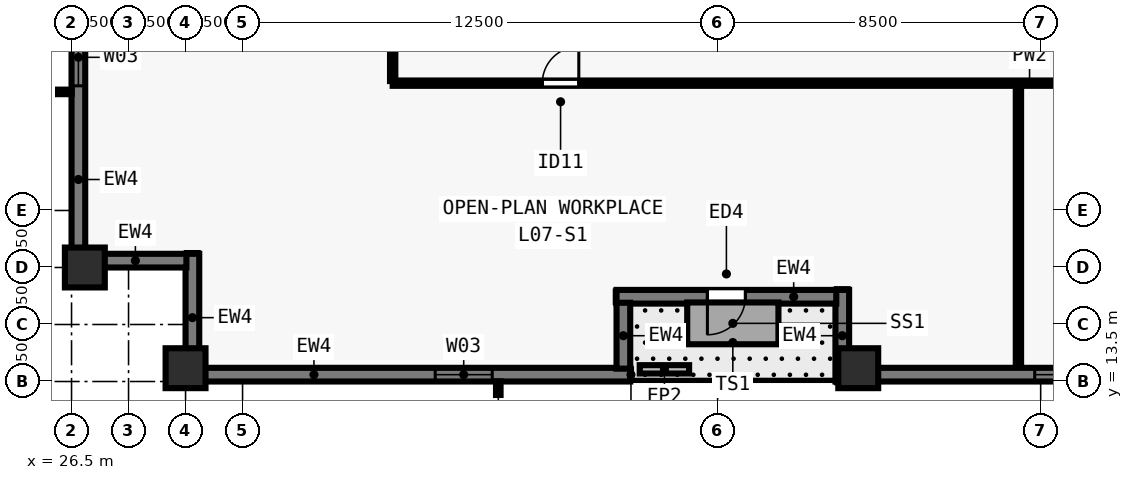
"""IFC4 building model, lengths in metres.
Left out: names, types, materials, properties, quantities, classifications, styles, units other than length and angle.
Written with IfcOpenShell. Run it as: python <this file> out.ifc"""

import sys

from ifc_helpers import new_model, si_unit, direction, frame, frame_2d, origin, origin_2d, place, context, subcontext, project, spatial, rectangle, extrude, element, fill, save


model = new_model("IFC4")
c1 = context("Model", 3, precision=1e-05, world=origin(), true_north=direction((0.0, 1.0)))
c2 = subcontext(c1, "Body", "Model", "MODEL_VIEW")
j1 = project(units=[si_unit("LENGTHUNIT", "METRE"), si_unit("PLANEANGLEUNIT", "RADIAN")], contexts=[c1])
p1 = place(None, origin())
s1 = spatial("IfcSite", under=j1, at=p1, CompositionType="ELEMENT")
p2 = place(p1, origin())
s2 = spatial("IfcBuilding", under=s1, at=p2, CompositionType="ELEMENT")
p3 = place(p2, frame((0.0, 0.0, 30.5)))
s3 = spatial("IfcBuildingStorey", under=s2, at=p3, CompositionType="ELEMENT", Elevation=30.5)
for number, where, z_axis, x_axis in (
    (1, (29.5, 13.85, 0.0), (0.0, 0.0, 1.0), (1.0, 0.0, 0.0)),
    (2, (47.2, 13.85, 0.0), (0.0, 0.0, 1.0), (1.0, 0.0, 0.0)),
    (3, (26.85, 16.5, 0.0), (0.0, 0.0, 1.0), (0.0, 1.0, 0.0)),
):
    element("IfcColumn", number, at=place(p3, frame(where, z_axis=z_axis, x_axis=x_axis)), inside=s3, PredefinedType="COLUMN", context=c2, shape_type="SweptSolid", body=[
        extrude(rectangle(XDim=1.05, YDim=1.05, at=origin_2d()), origin(), (0.0, 0.0, 1.0), 3.5),
    ])
p4 = place(p3, frame((41.2, 13.68, 0.0), z_axis=(0.0, 0.0, 1.0), x_axis=(-1.0, 0.0, 0.0)))
e4 = element("IfcWall", 4, at=p4, inside=s3, PredefinedType="SOLIDWALL", context=c2, shape_type="SweptSolid", body=[
    extrude(rectangle(XDim=11.362, YDim=0.36, at=frame_2d((5.681, 0.0))), origin(), (0.0, 0.0, 1.0), 3.28),
])
p5 = place(p4, frame((3.631, 0.0, 0.8)))
e5 = element("IfcOpeningElement", 5, at=p5, cuts=e4, PredefinedType="OPENING", context=c2, shape_type="SweptSolid", body=[
    extrude(rectangle(XDim=1.5, YDim=1.544, at=frame_2d((0.75, 0.772))), frame((0.0, 0.19, 0.0), z_axis=(0.0, -1.0, 0.0), x_axis=(1.0, 0.0, 0.0)), (0.0, 0.0, 1.0), 0.38),
])
p6 = place(p3, frame((29.68, 13.5, 0.0), z_axis=(0.0, 0.0, 1.0), x_axis=(0.0, 1.0, 0.0)))
e6 = element("IfcWall", 6, at=p6, inside=s3, PredefinedType="SOLIDWALL", context=c2, shape_type="SweptSolid", body=[
    extrude(rectangle(XDim=3.36, YDim=0.36, at=frame_2d((1.68, 0.0))), origin(), (0.0, 0.0, 1.0), 3.28),
])
p7 = place(p3, frame((29.522, 16.68, 0.0), z_axis=(0.0, 0.0, 1.0), x_axis=(-1.0, 0.0, 0.0)))
e7 = element("IfcWall", 7, at=p7, inside=s3, PredefinedType="SOLIDWALL", context=c2, shape_type="SweptSolid", body=[
    extrude(rectangle(XDim=2.684, YDim=0.36, at=frame_2d((1.342, 0.0))), origin(), (0.0, 0.0, 1.0), 3.28),
])
p8 = place(p3, frame((26.68, 16.5, 0.0), z_axis=(0.0, 0.0, 1.0), x_axis=(0.0, 1.0, 0.0)))
e8 = element("IfcWall", 8, at=p8, inside=s3, PredefinedType="SOLIDWALL", context=c2, shape_type="SweptSolid", body=[
    extrude(rectangle(XDim=44.662, YDim=0.36, at=frame_2d((22.331, 0.0))), origin(), (0.0, 0.0, 1.0), 3.28),
])
p9 = place(p8, frame((4.78, 0.0, 0.8)))
e9 = element("IfcOpeningElement", 9, at=p9, cuts=e8, PredefinedType="OPENING", context=c2, shape_type="SweptSolid", body=[
    extrude(rectangle(XDim=1.5, YDim=1.544, at=frame_2d((0.75, 0.772))), frame((0.0, 0.19, 0.0), z_axis=(0.0, -1.0, 0.0), x_axis=(1.0, 0.0, 0.0)), (0.0, 0.0, 1.0), 0.38),
])
p10 = place(p8, frame((8.29, 0.0, 0.8)))
e10 = element("IfcOpeningElement", 10, at=p10, cuts=e8, PredefinedType="OPENING", context=c2, shape_type="SweptSolid", body=[
    extrude(rectangle(XDim=1.2, YDim=1.544, at=frame_2d((0.6, 0.772))), frame((0.0, 0.19, 0.0), z_axis=(0.0, -1.0, 0.0), x_axis=(1.0, 0.0, 0.0)), (0.0, 0.0, 1.0), 0.38),
])
p11 = place(p8, frame((11.5, 0.0, 0.8)))
e11 = element("IfcOpeningElement", 11, at=p11, cuts=e8, PredefinedType="OPENING", context=c2, shape_type="SweptSolid", body=[
    extrude(rectangle(XDim=1.5, YDim=1.544, at=frame_2d((0.75, 0.772))), frame((0.0, 0.19, 0.0), z_axis=(0.0, -1.0, 0.0), x_axis=(1.0, 0.0, 0.0)), (0.0, 0.0, 1.0), 0.38),
])
p12 = place(p8, frame((14.561, 0.0, 0.8)))
e12 = element("IfcOpeningElement", 12, at=p12, cuts=e8, PredefinedType="OPENING", context=c2, shape_type="SweptSolid", body=[
    extrude(rectangle(XDim=1.2, YDim=1.544, at=frame_2d((0.6, 0.772))), frame((0.0, 0.19, 0.0), z_axis=(0.0, -1.0, 0.0), x_axis=(1.0, 0.0, 0.0)), (0.0, 0.0, 1.0), 0.38),
])
p13 = place(p8, frame((18.671, 0.0, 0.8)))
e13 = element("IfcOpeningElement", 13, at=p13, cuts=e8, PredefinedType="OPENING", context=c2, shape_type="SweptSolid", body=[
    extrude(rectangle(XDim=1.5, YDim=1.544, at=frame_2d((0.75, 0.772))), frame((0.0, 0.19, 0.0), z_axis=(0.0, -1.0, 0.0), x_axis=(1.0, 0.0, 0.0)), (0.0, 0.0, 1.0), 0.38),
])
p14 = place(p8, frame((21.731, 0.0, 0.8)))
e14 = element("IfcOpeningElement", 14, at=p14, cuts=e8, PredefinedType="OPENING", context=c2, shape_type="SweptSolid", body=[
    extrude(rectangle(XDim=1.2, YDim=1.544, at=frame_2d((0.6, 0.772))), frame((0.0, 0.19, 0.0), z_axis=(0.0, -1.0, 0.0), x_axis=(1.0, 0.0, 0.0)), (0.0, 0.0, 1.0), 0.38),
])
p15 = place(p8, frame((24.941, 0.0, 0.8)))
e15 = element("IfcOpeningElement", 15, at=p15, cuts=e8, PredefinedType="OPENING", context=c2, shape_type="SweptSolid", body=[
    extrude(rectangle(XDim=1.5, YDim=1.544, at=frame_2d((0.75, 0.772))), frame((0.0, 0.19, 0.0), z_axis=(0.0, -1.0, 0.0), x_axis=(1.0, 0.0, 0.0)), (0.0, 0.0, 1.0), 0.38),
])
p16 = place(p8, frame((29.302, 0.0, 0.8)))
e16 = element("IfcOpeningElement", 16, at=p16, cuts=e8, PredefinedType="OPENING", context=c2, shape_type="SweptSolid", body=[
    extrude(rectangle(XDim=1.2, YDim=1.544, at=frame_2d((0.6, 0.772))), frame((0.0, 0.19, 0.0), z_axis=(0.0, -1.0, 0.0), x_axis=(1.0, 0.0, 0.0)), (0.0, 0.0, 1.0), 0.38),
])
p17 = place(p8, frame((31.662, 0.0, 0.8)))
e17 = element("IfcOpeningElement", 17, at=p17, cuts=e8, PredefinedType="OPENING", context=c2, shape_type="SweptSolid", body=[
    extrude(rectangle(XDim=1.5, YDim=1.544, at=frame_2d((0.75, 0.772))), frame((0.0, 0.19, 0.0), z_axis=(0.0, -1.0, 0.0), x_axis=(1.0, 0.0, 0.0)), (0.0, 0.0, 1.0), 0.38),
])
p18 = place(p8, frame((35.172, 0.0, 0.8)))
e18 = element("IfcOpeningElement", 18, at=p18, cuts=e8, PredefinedType="OPENING", context=c2, shape_type="SweptSolid", body=[
    extrude(rectangle(XDim=1.2, YDim=1.544, at=frame_2d((0.6, 0.772))), frame((0.0, 0.19, 0.0), z_axis=(0.0, -1.0, 0.0), x_axis=(1.0, 0.0, 0.0)), (0.0, 0.0, 1.0), 0.38),
])
p19 = place(p8, frame((38.382, 0.0, 0.8)))
e19 = element("IfcOpeningElement", 19, at=p19, cuts=e8, PredefinedType="OPENING", context=c2, shape_type="SweptSolid", body=[
    extrude(rectangle(XDim=1.5, YDim=1.544, at=frame_2d((0.75, 0.772))), frame((0.0, 0.19, 0.0), z_axis=(0.0, -1.0, 0.0), x_axis=(1.0, 0.0, 0.0)), (0.0, 0.0, 1.0), 0.38),
])
p20 = place(p3, frame((74.5, 13.68, 0.0), z_axis=(0.0, 0.0, 1.0), x_axis=(-1.0, 0.0, 0.0)))
e20 = element("IfcWall", 20, at=p20, inside=s3, PredefinedType="SOLIDWALL", context=c2, shape_type="SweptSolid", body=[
    extrude(rectangle(XDim=27.562, YDim=0.36, at=frame_2d((13.781, 0.0))), origin(), (0.0, 0.0, 1.0), 3.28),
])
p21 = place(p20, frame((4.755, 0.0, 0.8)))
e21 = element("IfcOpeningElement", 21, at=p21, cuts=e20, PredefinedType="OPENING", context=c2, shape_type="SweptSolid", body=[
    extrude(rectangle(XDim=1.5, YDim=1.544, at=frame_2d((0.75, 0.772))), frame((0.0, 0.19, 0.0), z_axis=(0.0, -1.0, 0.0), x_axis=(1.0, 0.0, 0.0)), (0.0, 0.0, 1.0), 0.38),
])
p22 = place(p20, frame((8.216, 0.0, 0.8)))
e22 = element("IfcOpeningElement", 22, at=p22, cuts=e20, PredefinedType="OPENING", context=c2, shape_type="SweptSolid", body=[
    extrude(rectangle(XDim=1.2, YDim=1.544, at=frame_2d((0.6, 0.772))), frame((0.0, 0.19, 0.0), z_axis=(0.0, -1.0, 0.0), x_axis=(1.0, 0.0, 0.0)), (0.0, 0.0, 1.0), 0.38),
])
p23 = place(p20, frame((11.376, 0.0, 0.8)))
e23 = element("IfcOpeningElement", 23, at=p23, cuts=e20, PredefinedType="OPENING", context=c2, shape_type="SweptSolid", body=[
    extrude(rectangle(XDim=1.5, YDim=1.544, at=frame_2d((0.75, 0.772))), frame((0.0, 0.19, 0.0), z_axis=(0.0, -1.0, 0.0), x_axis=(1.0, 0.0, 0.0)), (0.0, 0.0, 1.0), 0.38),
])
p24 = place(p20, frame((14.836, 0.0, 0.8)))
e24 = element("IfcOpeningElement", 24, at=p24, cuts=e20, PredefinedType="OPENING", context=c2, shape_type="SweptSolid", body=[
    extrude(rectangle(XDim=1.2, YDim=1.544, at=frame_2d((0.6, 0.772))), frame((0.0, 0.19, 0.0), z_axis=(0.0, -1.0, 0.0), x_axis=(1.0, 0.0, 0.0)), (0.0, 0.0, 1.0), 0.38),
])
p25 = place(p20, frame((18.447, 0.0, 0.8)))
e25 = element("IfcOpeningElement", 25, at=p25, cuts=e20, PredefinedType="OPENING", context=c2, shape_type="SweptSolid", body=[
    extrude(rectangle(XDim=1.5, YDim=1.544, at=frame_2d((0.75, 0.772))), frame((0.0, 0.19, 0.0), z_axis=(0.0, -1.0, 0.0), x_axis=(1.0, 0.0, 0.0)), (0.0, 0.0, 1.0), 0.38),
])
p26 = place(p20, frame((21.457, 0.0, 0.8)))
e26 = element("IfcOpeningElement", 26, at=p26, cuts=e20, PredefinedType="OPENING", context=c2, shape_type="SweptSolid", body=[
    extrude(rectangle(XDim=1.2, YDim=1.544, at=frame_2d((0.6, 0.772))), frame((0.0, 0.19, 0.0), z_axis=(0.0, -1.0, 0.0), x_axis=(1.0, 0.0, 0.0)), (0.0, 0.0, 1.0), 0.38),
])
p27 = place(p3, frame((46.78, 13.5, 0.0), z_axis=(0.0, 0.0, 1.0), x_axis=(0.0, 1.0, 0.0)))
e27 = element("IfcWall", 27, at=p27, inside=s3, PredefinedType="SOLIDWALL", context=c2, shape_type="SweptSolid", body=[
    extrude(rectangle(XDim=2.41, YDim=0.36, at=frame_2d((1.205, 0.0))), origin(), (0.0, 0.0, 1.0), 3.28),
])
p28 = place(p3, frame((46.622, 15.73, 0.0), z_axis=(0.0, 0.0, 1.0), x_axis=(-1.0, 0.0, 0.0)))
e28 = element("IfcWall", 28, at=p28, inside=s3, PredefinedType="SOLIDWALL", context=c2, shape_type="SweptSolid", body=[
    extrude(rectangle(XDim=5.782, YDim=0.36, at=frame_2d((2.891, 0.0))), origin(), (0.0, 0.0, 1.0), 3.28),
])
p29 = place(p28, frame((2.391, 0.0, 0.0)))
e29 = element("IfcOpeningElement", 29, at=p29, cuts=e28, PredefinedType="OPENING", context=c2, shape_type="SweptSolid", body=[
    extrude(rectangle(XDim=1.0, YDim=2.15, at=frame_2d((0.5, 1.075))), frame((0.0, 0.19, 0.0), z_axis=(0.0, -1.0, 0.0), x_axis=(1.0, 0.0, 0.0)), (0.0, 0.0, 1.0), 0.38),
])
p30 = place(p3, frame((41.02, 15.572, 0.0), z_axis=(0.0, 0.0, 1.0), x_axis=(0.0, -1.0, 0.0)))
e30 = element("IfcWall", 30, at=p30, inside=s3, PredefinedType="SOLIDWALL", context=c2, shape_type="SweptSolid", body=[
    extrude(rectangle(XDim=1.734, YDim=0.36, at=frame_2d((0.867, 0.0))), origin(), (0.0, 0.0, 1.0), 3.28),
])
p31 = place(p3, frame((41.45, 13.82, 0.0), z_axis=(0.0, 0.0, 1.0), x_axis=(1.0, 0.0, 0.0)))
e31 = element("IfcWall", 31, at=p31, inside=s3, PredefinedType="PARAPET", context=c2, shape_type="SweptSolid", body=[
    extrude(rectangle(XDim=1.3, YDim=0.22, at=frame_2d((0.65, 0.0))), origin(), (0.0, 0.0, 1.0), 0.55),
])
p32 = place(p3, frame((34.95, 21.35, 0.0), z_axis=(0.0, 0.0, 1.0), x_axis=(1.0, 0.0, 0.0)))
e32 = element("IfcWall", 32, at=p32, inside=s3, PredefinedType="PARTITIONING", context=c2, shape_type="SweptSolid", body=[
    extrude(rectangle(XDim=34.1, YDim=0.14, at=frame_2d((17.05, 0.0))), origin(), (0.0, 0.0, 1.0), 3.28),
])
p33 = place(p32, frame((3.938, 0.0, 0.0)))
e33 = element("IfcOpeningElement", 33, at=p33, cuts=e32, PredefinedType="OPENING", context=c2, shape_type="SweptSolid", body=[
    extrude(rectangle(XDim=0.96, YDim=2.12, at=frame_2d((0.48, 1.06))), frame((0.0, 0.08, 0.0), z_axis=(0.0, -1.0, 0.0), x_axis=(1.0, 0.0, 0.0)), (0.0, 0.0, 1.0), 0.16),
])
p34 = place(p32, frame((28.617, 0.0, 0.0)))
e34 = element("IfcOpeningElement", 34, at=p34, cuts=e32, PredefinedType="OPENING", context=c2, shape_type="SweptSolid", body=[
    extrude(rectangle(XDim=0.96, YDim=2.12, at=frame_2d((0.48, 1.06))), frame((0.0, 0.08, 0.0), z_axis=(0.0, -1.0, 0.0), x_axis=(1.0, 0.0, 0.0)), (0.0, 0.0, 1.0), 0.16),
])
p35 = place(p3, frame((34.95, 21.405, 0.0), z_axis=(0.0, 0.0, 1.0), x_axis=(0.0, 1.0, 0.0)))
e35 = element("IfcWall", 35, at=p35, inside=s3, PredefinedType="PARTITIONING", context=c2, shape_type="SweptSolid", body=[
    extrude(rectangle(XDim=35.19, YDim=0.14, at=frame_2d((17.595, 0.0))), origin(), (0.0, 0.0, 1.0), 3.28),
])
p36 = place(p35, frame((5.21, 0.0, 0.0)))
e36 = element("IfcOpeningElement", 36, at=p36, cuts=e35, PredefinedType="OPENING", context=c2, shape_type="SweptSolid", body=[
    extrude(rectangle(XDim=0.96, YDim=2.12, at=frame_2d((0.48, 1.06))), frame((0.0, 0.08, 0.0), z_axis=(0.0, -1.0, 0.0), x_axis=(1.0, 0.0, 0.0)), (0.0, 0.0, 1.0), 0.16),
])
p37 = place(p35, frame((17.052, 0.0, 0.0)))
e37 = element("IfcOpeningElement", 37, at=p37, cuts=e35, PredefinedType="OPENING", context=c2, shape_type="SweptSolid", body=[
    extrude(rectangle(XDim=0.96, YDim=2.12, at=frame_2d((0.48, 1.06))), frame((0.0, 0.08, 0.0), z_axis=(0.0, -1.0, 0.0), x_axis=(1.0, 0.0, 0.0)), (0.0, 0.0, 1.0), 0.16),
])
p38 = place(p35, frame((28.957, 0.0, 0.0)))
e38 = element("IfcOpeningElement", 38, at=p38, cuts=e35, PredefinedType="OPENING", context=c2, shape_type="SweptSolid", body=[
    extrude(rectangle(XDim=0.96, YDim=2.12, at=frame_2d((0.48, 1.06))), frame((0.0, 0.08, 0.0), z_axis=(0.0, -1.0, 0.0), x_axis=(1.0, 0.0, 0.0)), (0.0, 0.0, 1.0), 0.16),
])
p39 = place(p3, frame((51.415, 13.92, 0.0), z_axis=(0.0, 0.0, 1.0), x_axis=(0.0, 1.0, 0.0)))
e39 = element("IfcWall", 39, at=p39, inside=s3, PredefinedType="PARTITIONING", context=c2, shape_type="SweptSolid", body=[
    extrude(rectangle(XDim=7.33, YDim=0.14, at=frame_2d((3.665, 0.0))), origin(), (0.0, 0.0, 1.0), 2.849),
])
p40 = place(p5, origin())
e40 = element("IfcWindow", 40, at=p40, inside=s3, PartitioningType="SINGLE_PANEL", PredefinedType="WINDOW", context=c2, shape_type="SweptSolid", body=[
    extrude(rectangle(XDim=1.5, YDim=1.544, at=frame_2d((0.75, 0.772))), frame((0.0, -0.05, 0.0), z_axis=(0.0, -1.0, 0.0), x_axis=(1.0, 0.0, 0.0)), (0.0, 0.0, 1.0), 0.06),
])
fill(e5, e40)
p41 = place(p9, origin())
e41 = element("IfcWindow", 41, at=p41, inside=s3, PartitioningType="SINGLE_PANEL", PredefinedType="WINDOW", context=c2, shape_type="SweptSolid", body=[
    extrude(rectangle(XDim=1.5, YDim=1.544, at=frame_2d((0.75, 0.772))), frame((0.0, -0.05, 0.0), z_axis=(0.0, -1.0, 0.0), x_axis=(1.0, 0.0, 0.0)), (0.0, 0.0, 1.0), 0.06),
])
fill(e9, e41)
p42 = place(p26, origin())
e42 = element("IfcWindow", 42, at=p42, inside=s3, PartitioningType="SINGLE_PANEL", PredefinedType="WINDOW", context=c2, shape_type="SweptSolid", body=[
    extrude(rectangle(XDim=1.2, YDim=1.544, at=frame_2d((0.6, 0.772))), frame((0.0, -0.05, 0.0), z_axis=(0.0, -1.0, 0.0), x_axis=(1.0, 0.0, 0.0)), (0.0, 0.0, 1.0), 0.06),
])
fill(e26, e42)
p43 = place(p29, origin())
e43 = element("IfcDoor", 43, at=p43, inside=s3, OperationType="SINGLE_SWING_RIGHT", PredefinedType="DOOR", context=c2, shape_type="SweptSolid", body=[
    extrude(rectangle(XDim=1.0, YDim=2.15, at=frame_2d((0.5, 1.075))), frame((0.0, 0.025, 0.0), z_axis=(0.0, -1.0, 0.0), x_axis=(1.0, 0.0, 0.0)), (0.0, 0.0, 1.0), 0.05),
])
fill(e29, e43)
p44 = place(p33, origin())
e44 = element("IfcDoor", 44, at=p44, inside=s3, OperationType="SINGLE_SWING_RIGHT", PredefinedType="DOOR", context=c2, shape_type="SweptSolid", body=[
    extrude(rectangle(XDim=0.96, YDim=2.12, at=frame_2d((0.48, 1.06))), frame((0.0, 0.025, 0.0), z_axis=(0.0, -1.0, 0.0), x_axis=(1.0, 0.0, 0.0)), (0.0, 0.0, 1.0), 0.05),
])
fill(e33, e44)
save(model, sys.argv[1])
